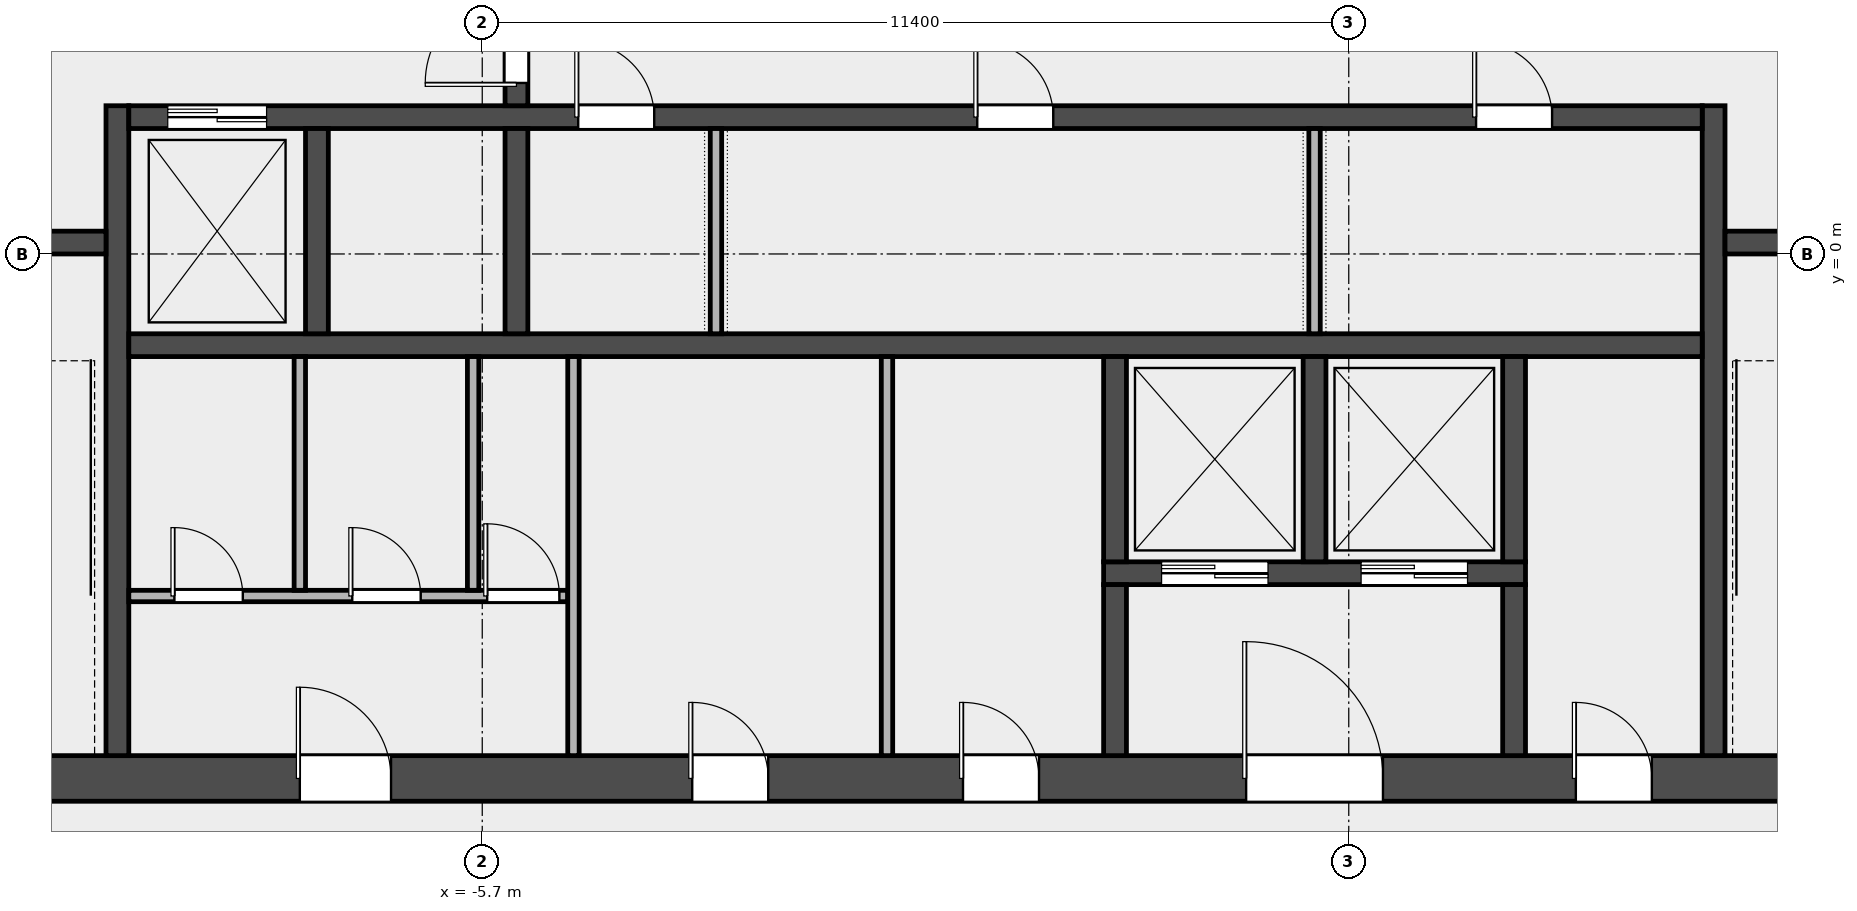
"""IFC4 building model, lengths in metres.
Left out: names, types, materials, properties, quantities, classifications, styles, units other than length and angle.
Written with IfcOpenShell. Run it as: python <this file> out.ifc"""

import sys

from ifc_helpers import new_model, si_unit, direction, frame, frame_2d, origin, place, context, subcontext, project, spatial, rectangle, extrude, element, fill, save


model = new_model("IFC4")
c1 = context("Model", 3, precision=1e-05, world=origin(), true_north=direction((0.0, 1.0)))
c2 = subcontext(c1, "Body", "Model", "MODEL_VIEW")
j1 = project(units=[si_unit("LENGTHUNIT", "METRE"), si_unit("PLANEANGLEUNIT", "RADIAN")], contexts=[c1])
p1 = place(None, origin())
s1 = spatial("IfcSite", under=j1, at=p1, CompositionType="ELEMENT")
p2 = place(p1, origin())
s2 = spatial("IfcBuilding", under=s1, at=p2, CompositionType="ELEMENT")
p3 = place(p2, frame((0.0, 0.0, 279.4)))
s3 = spatial("IfcBuildingStorey", under=s2, at=p3, CompositionType="ELEMENT", Elevation=279.4)
p4 = place(p3, frame((-14.4, -6.9, 0.0), z_axis=(0.0, 0.0, 1.0), x_axis=(1.0, 0.0, 0.0)))
e1 = element("IfcWall", 1, at=p4, inside=s3, PredefinedType="SHEAR", context=c2, shape_type="SweptSolid", body=[
    extrude(rectangle(XDim=28.8, YDim=0.6, at=frame_2d((14.4, 0.0))), origin(), (0.0, 0.0, 1.0), 3.7),
])
p5 = place(p4, frame((6.3, 0.0, 0.0)))
e2 = element("IfcOpeningElement", 2, at=p5, cuts=e1, PredefinedType="OPENING", context=c2, shape_type="SweptSolid", body=[
    extrude(rectangle(XDim=1.2, YDim=2.1, at=frame_2d((0.6, 1.05))), frame((0.0, 0.312, 0.0), z_axis=(0.0, -1.0, 0.0), x_axis=(1.0, 0.0, 0.0)), (0.0, 0.0, 1.0), 0.624),
])
p6 = place(p4, frame((11.462, 0.0, 0.0)))
e3 = element("IfcOpeningElement", 3, at=p6, cuts=e1, PredefinedType="OPENING", context=c2, shape_type="SweptSolid", body=[
    extrude(rectangle(XDim=1.0, YDim=2.1, at=frame_2d((0.5, 1.05))), frame((0.0, 0.312, 0.0), z_axis=(0.0, -1.0, 0.0), x_axis=(1.0, 0.0, 0.0)), (0.0, 0.0, 1.0), 0.624),
])
p7 = place(p4, frame((15.025, 0.0, 0.0)))
e4 = element("IfcOpeningElement", 4, at=p7, cuts=e1, PredefinedType="OPENING", context=c2, shape_type="SweptSolid", body=[
    extrude(rectangle(XDim=1.0, YDim=2.1, at=frame_2d((0.5, 1.05))), frame((0.0, 0.312, 0.0), z_axis=(0.0, -1.0, 0.0), x_axis=(1.0, 0.0, 0.0)), (0.0, 0.0, 1.0), 0.624),
])
p8 = place(p4, frame((18.75, 0.0, 0.0)))
e5 = element("IfcOpeningElement", 5, at=p8, cuts=e1, PredefinedType="OPENING", context=c2, shape_type="SweptSolid", body=[
    extrude(rectangle(XDim=1.8, YDim=2.1, at=frame_2d((0.9, 1.05))), frame((0.0, 0.312, 0.0), z_axis=(0.0, -1.0, 0.0), x_axis=(1.0, 0.0, 0.0)), (0.0, 0.0, 1.0), 0.624),
])
p9 = place(p4, frame((23.087, 0.0, 0.0)))
e6 = element("IfcOpeningElement", 6, at=p9, cuts=e1, PredefinedType="OPENING", context=c2, shape_type="SweptSolid", body=[
    extrude(rectangle(XDim=1.0, YDim=2.1, at=frame_2d((0.5, 1.05))), frame((0.0, 0.312, 0.0), z_axis=(0.0, -1.0, 0.0), x_axis=(1.0, 0.0, 0.0)), (0.0, 0.0, 1.0), 0.624),
])
for number, where, z_axis, x_axis in (
    (7, (-10.5, -6.6, 0.0), (0.0, 0.0, 1.0), (0.0, 1.0, 0.0)),
    (8, (10.5, -6.6, 0.0), (0.0, 0.0, 1.0), (0.0, 1.0, 0.0)),
):
    element("IfcWall", number, at=place(p3, frame(where, z_axis=z_axis, x_axis=x_axis)), inside=s3, PredefinedType="SHEAR", context=c2, shape_type="SweptSolid", body=[
        extrude(rectangle(XDim=8.55, YDim=0.3, at=frame_2d((4.275, 0.0))), origin(), (0.0, 0.0, 1.0), 3.7),
    ])
p10 = place(p3, frame((-13.8, 0.15, 0.0), z_axis=(0.0, 0.0, 1.0), x_axis=(1.0, 0.0, 0.0)))
e9 = element("IfcWall", 9, at=p10, inside=s3, PredefinedType="SOLIDWALL", context=c2, shape_type="SweptSolid", body=[
    extrude(rectangle(XDim=3.15, YDim=0.3, at=frame_2d((1.575, 0.0))), origin(), (0.0, 0.0, 1.0), 3.7),
])
p11 = place(p10, frame((0.975, 0.0, 0.0)))
e10 = element("IfcOpeningElement", 10, at=p11, cuts=e9, PredefinedType="OPENING", context=c2, shape_type="SweptSolid", body=[
    extrude(rectangle(XDim=1.1, YDim=2.1, at=frame_2d((0.55, 1.05))), frame((0.0, 0.162, 0.0), z_axis=(0.0, -1.0, 0.0), x_axis=(1.0, 0.0, 0.0)), (0.0, 0.0, 1.0), 0.324),
])
p12 = place(p3, frame((10.65, 0.15, 0.0), z_axis=(0.0, 0.0, 1.0), x_axis=(1.0, 0.0, 0.0)))
e11 = element("IfcWall", 11, at=p12, inside=s3, PredefinedType="SOLIDWALL", context=c2, shape_type="SweptSolid", body=[
    extrude(rectangle(XDim=3.15, YDim=0.3, at=frame_2d((1.575, 0.0))), origin(), (0.0, 0.0, 1.0), 3.7),
])
p13 = place(p12, frame((1.025, 0.0, 0.0)))
e12 = element("IfcOpeningElement", 12, at=p13, cuts=e11, PredefinedType="OPENING", context=c2, shape_type="SweptSolid", body=[
    extrude(rectangle(XDim=1.1, YDim=2.1, at=frame_2d((0.55, 1.05))), frame((0.0, 0.162, 0.0), z_axis=(0.0, -1.0, 0.0), x_axis=(1.0, 0.0, 0.0)), (0.0, 0.0, 1.0), 0.324),
])
p14 = place(p3, frame((-10.35, -1.2, 0.0), z_axis=(0.0, 0.0, 1.0), x_axis=(1.0, 0.0, 0.0)))
e13 = element("IfcWall", 13, at=p14, inside=s3, PredefinedType="SOLIDWALL", context=c2, shape_type="SweptSolid", body=[
    extrude(rectangle(XDim=20.7, YDim=0.3, at=frame_2d((10.35, 0.0))), origin(), (0.0, 0.0, 1.0), 3.7),
])
p15 = place(p3, frame((-10.35, 1.8, 0.0), z_axis=(0.0, 0.0, 1.0), x_axis=(1.0, 0.0, 0.0)))
e14 = element("IfcWall", 14, at=p15, inside=s3, PredefinedType="SOLIDWALL", context=c2, shape_type="SweptSolid", body=[
    extrude(rectangle(XDim=20.7, YDim=0.3, at=frame_2d((10.35, 0.0))), origin(), (0.0, 0.0, 1.0), 3.7),
])
p16 = place(p15, frame((0.512, 0.0, 0.0)))
e15 = element("IfcOpeningElement", 15, at=p16, cuts=e14, PredefinedType="OPENING", context=c2, shape_type="SweptSolid", body=[
    extrude(rectangle(XDim=1.3, YDim=2.1, at=frame_2d((0.65, 1.05))), frame((0.0, 0.162, 0.0), z_axis=(0.0, -1.0, 0.0), x_axis=(1.0, 0.0, 0.0)), (0.0, 0.0, 1.0), 0.324),
])
p17 = place(p15, frame((5.913, 0.0, 0.0)))
e16 = element("IfcOpeningElement", 16, at=p17, cuts=e14, PredefinedType="OPENING", context=c2, shape_type="SweptSolid", body=[
    extrude(rectangle(XDim=1.0, YDim=2.1, at=frame_2d((0.5, 1.05))), frame((0.0, 0.162, 0.0), z_axis=(0.0, -1.0, 0.0), x_axis=(1.0, 0.0, 0.0)), (0.0, 0.0, 1.0), 0.324),
])
p18 = place(p15, frame((11.163, 0.0, 0.0)))
e17 = element("IfcOpeningElement", 17, at=p18, cuts=e14, PredefinedType="OPENING", context=c2, shape_type="SweptSolid", body=[
    extrude(rectangle(XDim=1.0, YDim=2.1, at=frame_2d((0.5, 1.05))), frame((0.0, 0.162, 0.0), z_axis=(0.0, -1.0, 0.0), x_axis=(1.0, 0.0, 0.0)), (0.0, 0.0, 1.0), 0.324),
])
p19 = place(p15, frame((17.725, 0.0, 0.0)))
e18 = element("IfcOpeningElement", 18, at=p19, cuts=e14, PredefinedType="OPENING", context=c2, shape_type="SweptSolid", body=[
    extrude(rectangle(XDim=1.0, YDim=2.1, at=frame_2d((0.5, 1.05))), frame((0.0, 0.162, 0.0), z_axis=(0.0, -1.0, 0.0), x_axis=(1.0, 0.0, 0.0)), (0.0, 0.0, 1.0), 0.324),
])
for number, where, z_axis, x_axis in (
    (19, (-7.875, -1.05, 0.0), (0.0, 0.0, 1.0), (0.0, 1.0, 0.0)),
    (20, (-5.25, -1.05, 0.0), (0.0, 0.0, 1.0), (0.0, 1.0, 0.0)),
):
    element("IfcWall", number, at=place(p3, frame(where, z_axis=z_axis, x_axis=x_axis)), inside=s3, PredefinedType="SOLIDWALL", context=c2, shape_type="SweptSolid", body=[
        extrude(rectangle(XDim=2.7, YDim=0.3, at=frame_2d((1.35, 0.0))), origin(), (0.0, 0.0, 1.0), 3.7),
    ])
p20 = place(p3, frame((-5.25, 1.95, 0.0), z_axis=(0.0, 0.0, 1.0), x_axis=(0.0, 1.0, 0.0)))
e21 = element("IfcWall", 21, at=p20, inside=s3, PredefinedType="SOLIDWALL", context=c2, shape_type="SweptSolid", body=[
    extrude(rectangle(XDim=3.3, YDim=0.3, at=frame_2d((1.65, 0.0))), origin(), (0.0, 0.0, 1.0), 3.7),
])
p21 = place(p20, frame((0.3, 0.0, 0.0)))
e22 = element("IfcOpeningElement", 22, at=p21, cuts=e21, PredefinedType="OPENING", context=c2, shape_type="SweptSolid", body=[
    extrude(rectangle(XDim=1.2, YDim=2.1, at=frame_2d((0.6, 1.05))), frame((0.0, 0.162, 0.0), z_axis=(0.0, -1.0, 0.0), x_axis=(1.0, 0.0, 0.0)), (0.0, 0.0, 1.0), 0.324),
])
p22 = place(p20, frame((1.8, 0.0, 0.0)))
e23 = element("IfcOpeningElement", 23, at=p22, cuts=e21, PredefinedType="OPENING", context=c2, shape_type="SweptSolid", body=[
    extrude(rectangle(XDim=1.2, YDim=2.1, at=frame_2d((0.6, 1.05))), frame((0.0, 0.162, 0.0), z_axis=(0.0, -1.0, 0.0), x_axis=(1.0, 0.0, 0.0)), (0.0, 0.0, 1.0), 0.324),
])
p23 = place(p3, frame((2.475, -4.2, 0.0), z_axis=(0.0, 0.0, 1.0), x_axis=(1.0, 0.0, 0.0)))
e24 = element("IfcWall", 24, at=p23, inside=s3, PredefinedType="SOLIDWALL", context=c2, shape_type="SweptSolid", body=[
    extrude(rectangle(XDim=5.55, YDim=0.3, at=frame_2d((2.775, 0.0))), origin(), (0.0, 0.0, 1.0), 3.7),
])
p24 = place(p23, frame((0.762, 0.0, 0.0)))
e25 = element("IfcOpeningElement", 25, at=p24, cuts=e24, PredefinedType="OPENING", context=c2, shape_type="SweptSolid", body=[
    extrude(rectangle(XDim=1.4, YDim=2.1, at=frame_2d((0.7, 1.05))), frame((0.0, 0.162, 0.0), z_axis=(0.0, -1.0, 0.0), x_axis=(1.0, 0.0, 0.0)), (0.0, 0.0, 1.0), 0.324),
])
p25 = place(p23, frame((3.387, 0.0, 0.0)))
e26 = element("IfcOpeningElement", 26, at=p25, cuts=e24, PredefinedType="OPENING", context=c2, shape_type="SweptSolid", body=[
    extrude(rectangle(XDim=1.4, YDim=2.1, at=frame_2d((0.7, 1.05))), frame((0.0, 0.162, 0.0), z_axis=(0.0, -1.0, 0.0), x_axis=(1.0, 0.0, 0.0)), (0.0, 0.0, 1.0), 0.324),
])
p26 = place(p3, frame((2.625, -4.05, 0.0), z_axis=(0.0, 0.0, 1.0), x_axis=(0.0, 1.0, 0.0)))
e27 = element("IfcWall", 27, at=p26, inside=s3, PredefinedType="SOLIDWALL", context=c2, shape_type="SweptSolid", body=[
    extrude(rectangle(XDim=2.7, YDim=0.3, at=frame_2d((1.35, 0.0))), origin(), (0.0, 0.0, 1.0), 3.7),
])
p27 = place(p3, frame((2.625, -6.6, 0.0), z_axis=(0.0, 0.0, 1.0), x_axis=(0.0, 1.0, 0.0)))
e28 = element("IfcWall", 28, at=p27, inside=s3, PredefinedType="SOLIDWALL", context=c2, shape_type="SweptSolid", body=[
    extrude(rectangle(XDim=2.25, YDim=0.3, at=frame_2d((1.125, 0.0))), origin(), (0.0, 0.0, 1.0), 3.7),
])
for number, where, z_axis, x_axis in (
    (29, (5.25, -4.05, 0.0), (0.0, 0.0, 1.0), (0.0, 1.0, 0.0)),
    (30, (7.875, -4.05, 0.0), (0.0, 0.0, 1.0), (0.0, 1.0, 0.0)),
):
    element("IfcWall", number, at=place(p3, frame(where, z_axis=z_axis, x_axis=x_axis)), inside=s3, PredefinedType="SOLIDWALL", context=c2, shape_type="SweptSolid", body=[
        extrude(rectangle(XDim=2.7, YDim=0.3, at=frame_2d((1.35, 0.0))), origin(), (0.0, 0.0, 1.0), 3.7),
    ])
p28 = place(p3, frame((7.875, -6.6, 0.0), z_axis=(0.0, 0.0, 1.0), x_axis=(0.0, 1.0, 0.0)))
e31 = element("IfcWall", 31, at=p28, inside=s3, PredefinedType="SOLIDWALL", context=c2, shape_type="SweptSolid", body=[
    extrude(rectangle(XDim=2.25, YDim=0.3, at=frame_2d((1.125, 0.0))), origin(), (0.0, 0.0, 1.0), 3.7),
])
p29 = place(p3, frame((-10.35, -4.5, 0.0), z_axis=(0.0, 0.0, 1.0), x_axis=(1.0, 0.0, 0.0)))
e32 = element("IfcWall", 32, at=p29, inside=s3, PredefinedType="PARTITIONING", context=c2, shape_type="SweptSolid", body=[
    extrude(rectangle(XDim=5.775, YDim=0.15, at=frame_2d((2.888, 0.0))), origin(), (0.0, 0.0, 1.0), 3.7),
])
p30 = place(p29, frame((0.6, 0.0, 0.0)))
e33 = element("IfcOpeningElement", 33, at=p30, cuts=e32, PredefinedType="OPENING", context=c2, shape_type="SweptSolid", body=[
    extrude(rectangle(XDim=0.9, YDim=2.1, at=frame_2d((0.45, 1.05))), frame((0.0, 0.087, 0.0), z_axis=(0.0, -1.0, 0.0), x_axis=(1.0, 0.0, 0.0)), (0.0, 0.0, 1.0), 0.174),
])
p31 = place(p29, frame((2.94, 0.0, 0.0)))
e34 = element("IfcOpeningElement", 34, at=p31, cuts=e32, PredefinedType="OPENING", context=c2, shape_type="SweptSolid", body=[
    extrude(rectangle(XDim=0.9, YDim=2.1, at=frame_2d((0.45, 1.05))), frame((0.0, 0.087, 0.0), z_axis=(0.0, -1.0, 0.0), x_axis=(1.0, 0.0, 0.0)), (0.0, 0.0, 1.0), 0.174),
])
p32 = place(p29, frame((4.715, 0.0, 0.0)))
e35 = element("IfcOpeningElement", 35, at=p32, cuts=e32, PredefinedType="OPENING", context=c2, shape_type="SweptSolid", body=[
    extrude(rectangle(XDim=0.95, YDim=2.1, at=frame_2d((0.475, 1.05))), frame((0.0, 0.087, 0.0), z_axis=(0.0, -1.0, 0.0), x_axis=(1.0, 0.0, 0.0)), (0.0, 0.0, 1.0), 0.174),
])
for number, where, z_axis, x_axis in (
    (36, (-8.1, -4.425, 0.0), (0.0, 0.0, 1.0), (0.0, 1.0, 0.0)),
    (37, (-5.82, -4.425, 0.0), (0.0, 0.0, 1.0), (0.0, 1.0, 0.0)),
):
    element("IfcWall", number, at=place(p3, frame(where, z_axis=z_axis, x_axis=x_axis)), inside=s3, PredefinedType="PARTITIONING", context=c2, shape_type="SweptSolid", body=[
        extrude(rectangle(XDim=3.075, YDim=0.15, at=frame_2d((1.538, 0.0))), origin(), (0.0, 0.0, 1.0), 3.7),
    ])
for number, where, z_axis, x_axis in (
    (38, (-4.5, -6.6, 0.0), (0.0, 0.0, 1.0), (0.0, 1.0, 0.0)),
    (39, (-0.375, -6.6, 0.0), (0.0, 0.0, 1.0), (0.0, 1.0, 0.0)),
):
    element("IfcWall", number, at=place(p3, frame(where, z_axis=z_axis, x_axis=x_axis)), inside=s3, PredefinedType="PARTITIONING", context=c2, shape_type="SweptSolid", body=[
        extrude(rectangle(XDim=5.25, YDim=0.15, at=frame_2d((2.625, 0.0))), origin(), (0.0, 0.0, 1.0), 3.7),
    ])
for number, where, z_axis, x_axis in (
    (40, (-2.625, -1.05, 0.0), (0.0, 0.0, 1.0), (0.0, 1.0, 0.0)),
    (41, (5.25, -1.05, 0.0), (0.0, 0.0, 1.0), (0.0, 1.0, 0.0)),
):
    element("IfcWall", number, at=place(p3, frame(where, z_axis=z_axis, x_axis=x_axis)), inside=s3, PredefinedType="PARTITIONING", context=c2, shape_type="SweptSolid", body=[
        extrude(rectangle(XDim=2.7, YDim=0.15, at=frame_2d((1.35, 0.0))), origin(), (0.0, 0.0, 1.0), 3.7),
    ])
p33 = place(p21, origin())
e42 = element("IfcDoor", 42, at=p33, inside=s3, OperationType="SINGLE_SWING_LEFT", PredefinedType="DOOR", context=c2, shape_type="SweptSolid", body=[
    extrude(rectangle(XDim=1.2, YDim=2.1, at=frame_2d((0.6, 1.05))), frame((0.0, 0.025, 0.0), z_axis=(0.0, -1.0, 0.0), x_axis=(1.0, 0.0, 0.0)), (0.0, 0.0, 1.0), 0.05),
])
fill(e22, e42)
p34 = place(p16, origin())
e43 = element("IfcDoor", 43, at=p34, inside=s3, OperationType="DOUBLE_DOOR_SLIDING", PredefinedType="DOOR", context=c2, shape_type="SweptSolid", body=[
    extrude(rectangle(XDim=1.3, YDim=2.1, at=frame_2d((0.65, 1.05))), frame((0.0, 0.025, 0.0), z_axis=(0.0, -1.0, 0.0), x_axis=(1.0, 0.0, 0.0)), (0.0, 0.0, 1.0), 0.05),
])
fill(e15, e43)
p35 = place(p24, origin())
e44 = element("IfcDoor", 44, at=p35, inside=s3, OperationType="DOUBLE_DOOR_SLIDING", PredefinedType="DOOR", context=c2, shape_type="SweptSolid", body=[
    extrude(rectangle(XDim=1.4, YDim=2.1, at=frame_2d((0.7, 1.05))), frame((0.0, 0.025, 0.0), z_axis=(0.0, -1.0, 0.0), x_axis=(1.0, 0.0, 0.0)), (0.0, 0.0, 1.0), 0.05),
])
fill(e25, e44)
p36 = place(p25, origin())
e45 = element("IfcDoor", 45, at=p36, inside=s3, OperationType="DOUBLE_DOOR_SLIDING", PredefinedType="DOOR", context=c2, shape_type="SweptSolid", body=[
    extrude(rectangle(XDim=1.4, YDim=2.1, at=frame_2d((0.7, 1.05))), frame((0.0, 0.025, 0.0), z_axis=(0.0, -1.0, 0.0), x_axis=(1.0, 0.0, 0.0)), (0.0, 0.0, 1.0), 0.05),
])
fill(e26, e45)
p37 = place(p5, origin())
e46 = element("IfcDoor", 46, at=p37, inside=s3, OperationType="SINGLE_SWING_LEFT", PredefinedType="DOOR", context=c2, shape_type="SweptSolid", body=[
    extrude(rectangle(XDim=1.2, YDim=2.1, at=frame_2d((0.6, 1.05))), frame((0.0, 0.025, 0.0), z_axis=(0.0, -1.0, 0.0), x_axis=(1.0, 0.0, 0.0)), (0.0, 0.0, 1.0), 0.05),
])
fill(e2, e46)
p38 = place(p30, origin())
e47 = element("IfcDoor", 47, at=p38, inside=s3, OperationType="SINGLE_SWING_LEFT", PredefinedType="DOOR", context=c2, shape_type="SweptSolid", body=[
    extrude(rectangle(XDim=0.9, YDim=2.1, at=frame_2d((0.45, 1.05))), frame((0.0, 0.025, 0.0), z_axis=(0.0, -1.0, 0.0), x_axis=(1.0, 0.0, 0.0)), (0.0, 0.0, 1.0), 0.05),
])
fill(e33, e47)
p39 = place(p31, origin())
e48 = element("IfcDoor", 48, at=p39, inside=s3, OperationType="SINGLE_SWING_LEFT", PredefinedType="DOOR", context=c2, shape_type="SweptSolid", body=[
    extrude(rectangle(XDim=0.9, YDim=2.1, at=frame_2d((0.45, 1.05))), frame((0.0, 0.025, 0.0), z_axis=(0.0, -1.0, 0.0), x_axis=(1.0, 0.0, 0.0)), (0.0, 0.0, 1.0), 0.05),
])
fill(e34, e48)
p40 = place(p32, origin())
e49 = element("IfcDoor", 49, at=p40, inside=s3, OperationType="SINGLE_SWING_LEFT", PredefinedType="DOOR", context=c2, shape_type="SweptSolid", body=[
    extrude(rectangle(XDim=0.95, YDim=2.1, at=frame_2d((0.475, 1.05))), frame((0.0, 0.025, 0.0), z_axis=(0.0, -1.0, 0.0), x_axis=(1.0, 0.0, 0.0)), (0.0, 0.0, 1.0), 0.05),
])
fill(e35, e49)
p41 = place(p6, origin())
e50 = element("IfcDoor", 50, at=p41, inside=s3, OperationType="SINGLE_SWING_LEFT", PredefinedType="DOOR", context=c2, shape_type="SweptSolid", body=[
    extrude(rectangle(XDim=1.0, YDim=2.1, at=frame_2d((0.5, 1.05))), frame((0.0, 0.025, 0.0), z_axis=(0.0, -1.0, 0.0), x_axis=(1.0, 0.0, 0.0)), (0.0, 0.0, 1.0), 0.05),
])
fill(e3, e50)
p42 = place(p7, origin())
e51 = element("IfcDoor", 51, at=p42, inside=s3, OperationType="SINGLE_SWING_LEFT", PredefinedType="DOOR", context=c2, shape_type="SweptSolid", body=[
    extrude(rectangle(XDim=1.0, YDim=2.1, at=frame_2d((0.5, 1.05))), frame((0.0, 0.025, 0.0), z_axis=(0.0, -1.0, 0.0), x_axis=(1.0, 0.0, 0.0)), (0.0, 0.0, 1.0), 0.05),
])
fill(e4, e51)
p43 = place(p8, origin())
e52 = element("IfcDoor", 52, at=p43, inside=s3, OperationType="DOUBLE_DOOR_SINGLE_SWING", PredefinedType="DOOR", context=c2, shape_type="SweptSolid", body=[
    extrude(rectangle(XDim=1.8, YDim=2.1, at=frame_2d((0.9, 1.05))), frame((0.0, 0.025, 0.0), z_axis=(0.0, -1.0, 0.0), x_axis=(1.0, 0.0, 0.0)), (0.0, 0.0, 1.0), 0.05),
])
fill(e5, e52)
p44 = place(p9, origin())
e53 = element("IfcDoor", 53, at=p44, inside=s3, OperationType="SINGLE_SWING_LEFT", PredefinedType="DOOR", context=c2, shape_type="SweptSolid", body=[
    extrude(rectangle(XDim=1.0, YDim=2.1, at=frame_2d((0.5, 1.05))), frame((0.0, 0.025, 0.0), z_axis=(0.0, -1.0, 0.0), x_axis=(1.0, 0.0, 0.0)), (0.0, 0.0, 1.0), 0.05),
])
fill(e6, e53)
p45 = place(p17, origin())
e54 = element("IfcDoor", 54, at=p45, inside=s3, OperationType="SINGLE_SWING_LEFT", PredefinedType="DOOR", context=c2, shape_type="SweptSolid", body=[
    extrude(rectangle(XDim=1.0, YDim=2.1, at=frame_2d((0.5, 1.05))), frame((0.0, 0.025, 0.0), z_axis=(0.0, -1.0, 0.0), x_axis=(1.0, 0.0, 0.0)), (0.0, 0.0, 1.0), 0.05),
])
fill(e16, e54)
p46 = place(p18, origin())
e55 = element("IfcDoor", 55, at=p46, inside=s3, OperationType="SINGLE_SWING_LEFT", PredefinedType="DOOR", context=c2, shape_type="SweptSolid", body=[
    extrude(rectangle(XDim=1.0, YDim=2.1, at=frame_2d((0.5, 1.05))), frame((0.0, 0.025, 0.0), z_axis=(0.0, -1.0, 0.0), x_axis=(1.0, 0.0, 0.0)), (0.0, 0.0, 1.0), 0.05),
])
fill(e17, e55)
p47 = place(p19, origin())
e56 = element("IfcDoor", 56, at=p47, inside=s3, OperationType="SINGLE_SWING_LEFT", PredefinedType="DOOR", context=c2, shape_type="SweptSolid", body=[
    extrude(rectangle(XDim=1.0, YDim=2.1, at=frame_2d((0.5, 1.05))), frame((0.0, 0.025, 0.0), z_axis=(0.0, -1.0, 0.0), x_axis=(1.0, 0.0, 0.0)), (0.0, 0.0, 1.0), 0.05),
])
fill(e18, e56)
save(model, sys.argv[1])
